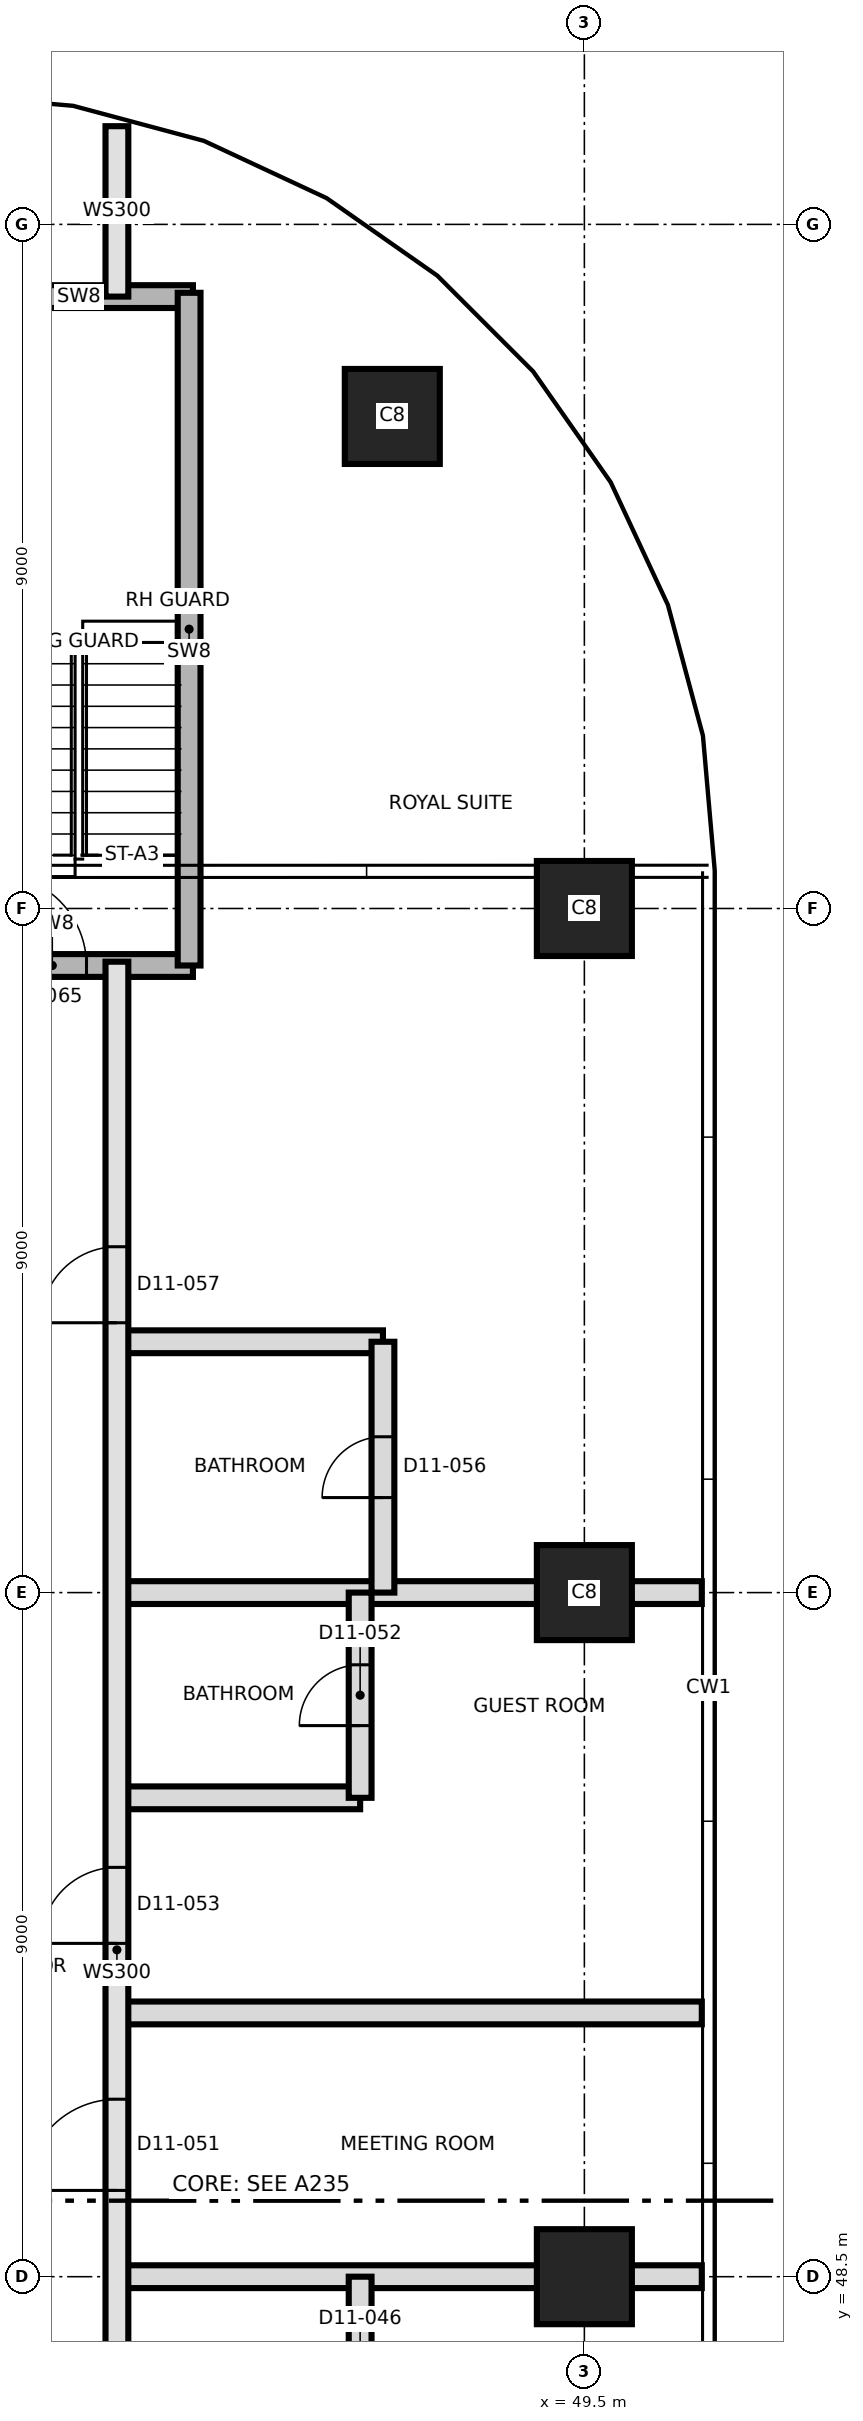
"""IFC4 building model, lengths in metres.
Left out: names, types, materials, properties, quantities, classifications, styles, units other than length and angle.
Written with IfcOpenShell. Run it as: python <this file> out.ifc"""

import sys

from ifc_helpers import new_model, si_unit, direction, frame, frame_2d, origin, origin_2d, place, context, subcontext, project, spatial, rectangle, extrude, element, fill, save


model = new_model("IFC4")
c1 = context("Model", 3, precision=1e-05, world=origin(), true_north=direction((0.0, 1.0)))
c2 = subcontext(c1, "Body", "Model", "MODEL_VIEW")
j1 = project(units=[si_unit("LENGTHUNIT", "METRE"), si_unit("PLANEANGLEUNIT", "RADIAN")], contexts=[c1])
p1 = place(None, origin())
s1 = spatial("IfcSite", under=j1, at=p1, CompositionType="ELEMENT")
p2 = place(p1, origin())
s2 = spatial("IfcBuilding", under=s1, at=p2, CompositionType="ELEMENT")
p3 = place(p2, frame((0.0, 0.0, 131.5)))
s3 = spatial("IfcBuildingStorey", under=s2, at=p3, CompositionType="ELEMENT", Elevation=131.5)
for number, where, z_axis, x_axis in (
    (1, (49.5, 48.5, 0.0), (0.0, 0.0, 1.0), (1.0, 0.0, 0.0)),
    (2, (49.5, 57.5, 0.0), (0.0, 0.0, 1.0), (1.0, 0.0, 0.0)),
    (3, (49.5, 66.5, 0.0), (0.0, 0.0, 1.0), (1.0, 0.0, 0.0)),
    (4, (46.973, 72.973, 0.0), (0.0, 0.0, 1.0), (1.0, 0.0, 0.0)),
):
    element("IfcColumn", number, at=place(p3, frame(where, z_axis=z_axis, x_axis=x_axis)), inside=s3, PredefinedType="COLUMN", context=c2, shape_type="SweptSolid", body=[
        extrude(rectangle(XDim=1.25, YDim=1.25, at=origin_2d()), origin(), (0.0, 0.0, 1.0), 3.7),
    ])
for number, where, z_axis, x_axis in (
    (5, (43.35, 48.5, 0.0), (0.0, 0.0, 1.0), (1.0, 0.0, 0.0)),
    (6, (43.35, 51.97, 0.0), (0.0, 0.0, 1.0), (1.0, 0.0, 0.0)),
):
    element("IfcWall", number, at=place(p3, frame(where, z_axis=z_axis, x_axis=x_axis)), inside=s3, PredefinedType="PARTITIONING", context=c2, shape_type="SweptSolid", body=[
        extrude(rectangle(XDim=7.695, YDim=0.3, at=frame_2d((3.847, 0.0))), origin(), (0.0, 0.0, 1.0), 3.35),
    ])
p4 = place(p3, frame((43.35, 54.8, 0.0), z_axis=(0.0, 0.0, 1.0), x_axis=(1.0, 0.0, 0.0)))
e7 = element("IfcWall", 7, at=p4, inside=s3, PredefinedType="PARTITIONING", context=c2, shape_type="SweptSolid", body=[
    extrude(rectangle(XDim=3.2, YDim=0.3, at=frame_2d((1.6, 0.0))), origin(), (0.0, 0.0, 1.0), 3.4),
])
p5 = place(p3, frame((43.35, 57.5, 0.0), z_axis=(0.0, 0.0, 1.0), x_axis=(1.0, 0.0, 0.0)))
e8 = element("IfcWall", 8, at=p5, inside=s3, PredefinedType="PARTITIONING", context=c2, shape_type="SweptSolid", body=[
    extrude(rectangle(XDim=7.695, YDim=0.3, at=frame_2d((3.847, 0.0))), origin(), (0.0, 0.0, 1.0), 3.35),
])
p6 = place(p3, frame((43.35, 60.8, 0.0), z_axis=(0.0, 0.0, 1.0), x_axis=(1.0, 0.0, 0.0)))
e9 = element("IfcWall", 9, at=p6, inside=s3, PredefinedType="PARTITIONING", context=c2, shape_type="SweptSolid", body=[
    extrude(rectangle(XDim=3.5, YDim=0.3, at=frame_2d((1.75, 0.0))), origin(), (0.0, 0.0, 1.0), 3.4),
])
p7 = place(p3, frame((40.65, 65.75, 0.0), z_axis=(0.0, 0.0, 1.0), x_axis=(1.0, 0.0, 0.0)))
e10 = element("IfcWall", 10, at=p7, inside=s3, PredefinedType="SHEAR", context=c2, shape_type="SweptSolid", body=[
    extrude(rectangle(XDim=3.7, YDim=0.3, at=frame_2d((1.85, 0.0))), origin(), (0.0, 0.0, 1.0), 3.4),
])
p8 = place(p7, frame((1.1, 0.0, 0.0)))
e11 = element("IfcOpeningElement", 11, at=p8, cuts=e10, PredefinedType="OPENING", context=c2, shape_type="SweptSolid", body=[
    extrude(rectangle(XDim=1.2, YDim=2.1, at=frame_2d((0.6, 1.05))), frame((0.0, 0.16, 0.0), z_axis=(0.0, -1.0, 0.0), x_axis=(1.0, 0.0, 0.0)), (0.0, 0.0, 1.0), 0.32),
])
p9 = place(p3, frame((41.35, 74.55, 0.0), z_axis=(0.0, 0.0, 1.0), x_axis=(1.0, 0.0, 0.0)))
e12 = element("IfcWall", 12, at=p9, inside=s3, PredefinedType="SHEAR", context=c2, shape_type="SweptSolid", body=[
    extrude(rectangle(XDim=3.0, YDim=0.3, at=frame_2d((1.5, 0.0))), origin(), (0.0, 0.0, 1.0), 3.4),
])
p10 = place(p3, frame((43.35, 39.8, 0.0), z_axis=(0.0, 0.0, 1.0), x_axis=(0.0, 1.0, 0.0)))
e13 = element("IfcWall", 13, at=p10, inside=s3, PredefinedType="SOLIDWALL", context=c2, shape_type="SweptSolid", body=[
    extrude(rectangle(XDim=26.0, YDim=0.3, at=frame_2d((13.0, 0.0))), origin(), (0.0, 0.0, 1.0), 3.4),
])
p11 = place(p10, frame((1.4, 0.0, 0.0)))
e14 = element("IfcOpeningElement", 14, at=p11, cuts=e13, PredefinedType="OPENING", context=c2, shape_type="SweptSolid", body=[
    extrude(rectangle(XDim=1.2, YDim=2.1, at=frame_2d((0.6, 1.05))), frame((0.0, 0.16, 0.0), z_axis=(0.0, -1.0, 0.0), x_axis=(1.0, 0.0, 0.0)), (0.0, 0.0, 1.0), 0.32),
])
p12 = place(p10, frame((4.65, 0.0, 0.0)))
e15 = element("IfcOpeningElement", 15, at=p12, cuts=e13, PredefinedType="OPENING", context=c2, shape_type="SweptSolid", body=[
    extrude(rectangle(XDim=1.0, YDim=2.1, at=frame_2d((0.5, 1.05))), frame((0.0, 0.16, 0.0), z_axis=(0.0, -1.0, 0.0), x_axis=(1.0, 0.0, 0.0)), (0.0, 0.0, 1.0), 0.32),
])
p13 = place(p10, frame((9.835, 0.0, 0.0)))
e16 = element("IfcOpeningElement", 16, at=p13, cuts=e13, PredefinedType="OPENING", context=c2, shape_type="SweptSolid", body=[
    extrude(rectangle(XDim=1.2, YDim=2.1, at=frame_2d((0.6, 1.05))), frame((0.0, 0.16, 0.0), z_axis=(0.0, -1.0, 0.0), x_axis=(1.0, 0.0, 0.0)), (0.0, 0.0, 1.0), 0.32),
])
p14 = place(p10, frame((13.085, 0.0, 0.0)))
e17 = element("IfcOpeningElement", 17, at=p14, cuts=e13, PredefinedType="OPENING", context=c2, shape_type="SweptSolid", body=[
    extrude(rectangle(XDim=1.0, YDim=2.1, at=frame_2d((0.5, 1.05))), frame((0.0, 0.16, 0.0), z_axis=(0.0, -1.0, 0.0), x_axis=(1.0, 0.0, 0.0)), (0.0, 0.0, 1.0), 0.32),
])
p15 = place(p10, frame((21.25, 0.0, 0.0)))
e18 = element("IfcOpeningElement", 18, at=p15, cuts=e13, PredefinedType="OPENING", context=c2, shape_type="SweptSolid", body=[
    extrude(rectangle(XDim=1.0, YDim=2.4, at=frame_2d((0.5, 1.2))), frame((0.0, 0.16, 0.0), z_axis=(0.0, -1.0, 0.0), x_axis=(1.0, 0.0, 0.0)), (0.0, 0.0, 1.0), 0.32),
])
p16 = place(p3, frame((43.35, 74.55, 0.0), z_axis=(0.0, 0.0, 1.0), x_axis=(0.0, 1.0, 0.0)))
e19 = element("IfcWall", 19, at=p16, inside=s3, PredefinedType="SOLIDWALL", context=c2, shape_type="SweptSolid", body=[
    extrude(rectangle(XDim=2.242, YDim=0.3, at=frame_2d((1.121, 0.0))), origin(), (0.0, 0.0, 1.0), 3.35),
])
p17 = place(p3, frame((44.3, 65.75, 0.0), z_axis=(0.0, 0.0, 1.0), x_axis=(0.0, 1.0, 0.0)))
e20 = element("IfcWall", 20, at=p17, inside=s3, PredefinedType="SHEAR", context=c2, shape_type="SweptSolid", body=[
    extrude(rectangle(XDim=8.85, YDim=0.3, at=frame_2d((4.425, 0.0))), origin(), (0.0, 0.0, 1.0), 3.4),
])
p18 = place(p3, frame((46.55, 45.8, 0.0), z_axis=(0.0, 0.0, 1.0), x_axis=(0.0, 1.0, 0.0)))
e21 = element("IfcWall", 21, at=p18, inside=s3, PredefinedType="PARTITIONING", context=c2, shape_type="SweptSolid", body=[
    extrude(rectangle(XDim=2.7, YDim=0.3, at=frame_2d((1.35, 0.0))), origin(), (0.0, 0.0, 1.0), 3.4),
])
p19 = place(p18, frame((0.95, 0.0, 0.0)))
e22 = element("IfcOpeningElement", 22, at=p19, cuts=e21, PredefinedType="OPENING", context=c2, shape_type="SweptSolid", body=[
    extrude(rectangle(XDim=0.8, YDim=2.1, at=frame_2d((0.4, 1.05))), frame((0.0, 0.16, 0.0), z_axis=(0.0, -1.0, 0.0), x_axis=(1.0, 0.0, 0.0)), (0.0, 0.0, 1.0), 0.32),
])
p20 = place(p3, frame((46.55, 54.8, 0.0), z_axis=(0.0, 0.0, 1.0), x_axis=(0.0, 1.0, 0.0)))
e23 = element("IfcWall", 23, at=p20, inside=s3, PredefinedType="PARTITIONING", context=c2, shape_type="SweptSolid", body=[
    extrude(rectangle(XDim=2.7, YDim=0.3, at=frame_2d((1.35, 0.0))), origin(), (0.0, 0.0, 1.0), 3.4),
])
p21 = place(p20, frame((0.95, 0.0, 0.0)))
e24 = element("IfcOpeningElement", 24, at=p21, cuts=e23, PredefinedType="OPENING", context=c2, shape_type="SweptSolid", body=[
    extrude(rectangle(XDim=0.8, YDim=2.1, at=frame_2d((0.4, 1.05))), frame((0.0, 0.16, 0.0), z_axis=(0.0, -1.0, 0.0), x_axis=(1.0, 0.0, 0.0)), (0.0, 0.0, 1.0), 0.32),
])
p22 = place(p3, frame((46.85, 57.5, 0.0), z_axis=(0.0, 0.0, 1.0), x_axis=(0.0, 1.0, 0.0)))
e25 = element("IfcWall", 25, at=p22, inside=s3, PredefinedType="PARTITIONING", context=c2, shape_type="SweptSolid", body=[
    extrude(rectangle(XDim=3.3, YDim=0.3, at=frame_2d((1.65, 0.0))), origin(), (0.0, 0.0, 1.0), 3.4),
])
p23 = place(p22, frame((1.25, 0.0, 0.0)))
e26 = element("IfcOpeningElement", 26, at=p23, cuts=e25, PredefinedType="OPENING", context=c2, shape_type="SweptSolid", body=[
    extrude(rectangle(XDim=0.8, YDim=2.1, at=frame_2d((0.4, 1.05))), frame((0.0, 0.16, 0.0), z_axis=(0.0, -1.0, 0.0), x_axis=(1.0, 0.0, 0.0)), (0.0, 0.0, 1.0), 0.32),
])
p24 = place(p13, origin())
e27 = element("IfcDoor", 27, at=p24, inside=s3, OperationType="SINGLE_SWING_LEFT", PredefinedType="DOOR", context=c2, shape_type="SweptSolid", body=[
    extrude(rectangle(XDim=1.2, YDim=2.1, at=frame_2d((0.6, 1.05))), frame((0.0, 0.025, 0.0), z_axis=(0.0, -1.0, 0.0), x_axis=(1.0, 0.0, 0.0)), (0.0, 0.0, 1.0), 0.05),
])
fill(e16, e27)
p25 = place(p21, origin())
e28 = element("IfcDoor", 28, at=p25, inside=s3, OperationType="SINGLE_SWING_RIGHT", PredefinedType="DOOR", context=c2, shape_type="SweptSolid", body=[
    extrude(rectangle(XDim=0.8, YDim=2.1, at=frame_2d((0.4, 1.05))), frame((0.0, 0.025, 0.0), z_axis=(0.0, -1.0, 0.0), x_axis=(1.0, 0.0, 0.0)), (0.0, 0.0, 1.0), 0.05),
])
fill(e24, e28)
p26 = place(p14, origin())
e29 = element("IfcDoor", 29, at=p26, inside=s3, OperationType="SINGLE_SWING_LEFT", PredefinedType="DOOR", context=c2, shape_type="SweptSolid", body=[
    extrude(rectangle(XDim=1.0, YDim=2.1, at=frame_2d((0.5, 1.05))), frame((0.0, 0.025, 0.0), z_axis=(0.0, -1.0, 0.0), x_axis=(1.0, 0.0, 0.0)), (0.0, 0.0, 1.0), 0.05),
])
fill(e17, e29)
p27 = place(p23, origin())
e30 = element("IfcDoor", 30, at=p27, inside=s3, OperationType="SINGLE_SWING_LEFT", PredefinedType="DOOR", context=c2, shape_type="SweptSolid", body=[
    extrude(rectangle(XDim=0.8, YDim=2.1, at=frame_2d((0.4, 1.05))), frame((0.0, 0.025, 0.0), z_axis=(0.0, -1.0, 0.0), x_axis=(1.0, 0.0, 0.0)), (0.0, 0.0, 1.0), 0.05),
])
fill(e26, e30)
p28 = place(p15, origin())
e31 = element("IfcDoor", 31, at=p28, inside=s3, OperationType="SINGLE_SWING_RIGHT", PredefinedType="DOOR", context=c2, shape_type="SweptSolid", body=[
    extrude(rectangle(XDim=1.0, YDim=2.4, at=frame_2d((0.5, 1.2))), frame((0.0, 0.025, 0.0), z_axis=(0.0, -1.0, 0.0), x_axis=(1.0, 0.0, 0.0)), (0.0, 0.0, 1.0), 0.05),
])
fill(e18, e31)
p29 = place(p8, origin())
e32 = element("IfcDoor", 32, at=p29, inside=s3, OperationType="SINGLE_SWING_RIGHT", PredefinedType="DOOR", context=c2, shape_type="SweptSolid", body=[
    extrude(rectangle(XDim=1.2, YDim=2.1, at=frame_2d((0.6, 1.05))), frame((0.0, 0.025, 0.0), z_axis=(0.0, -1.0, 0.0), x_axis=(1.0, 0.0, 0.0)), (0.0, 0.0, 1.0), 0.05),
])
fill(e11, e32)
save(model, sys.argv[1])
